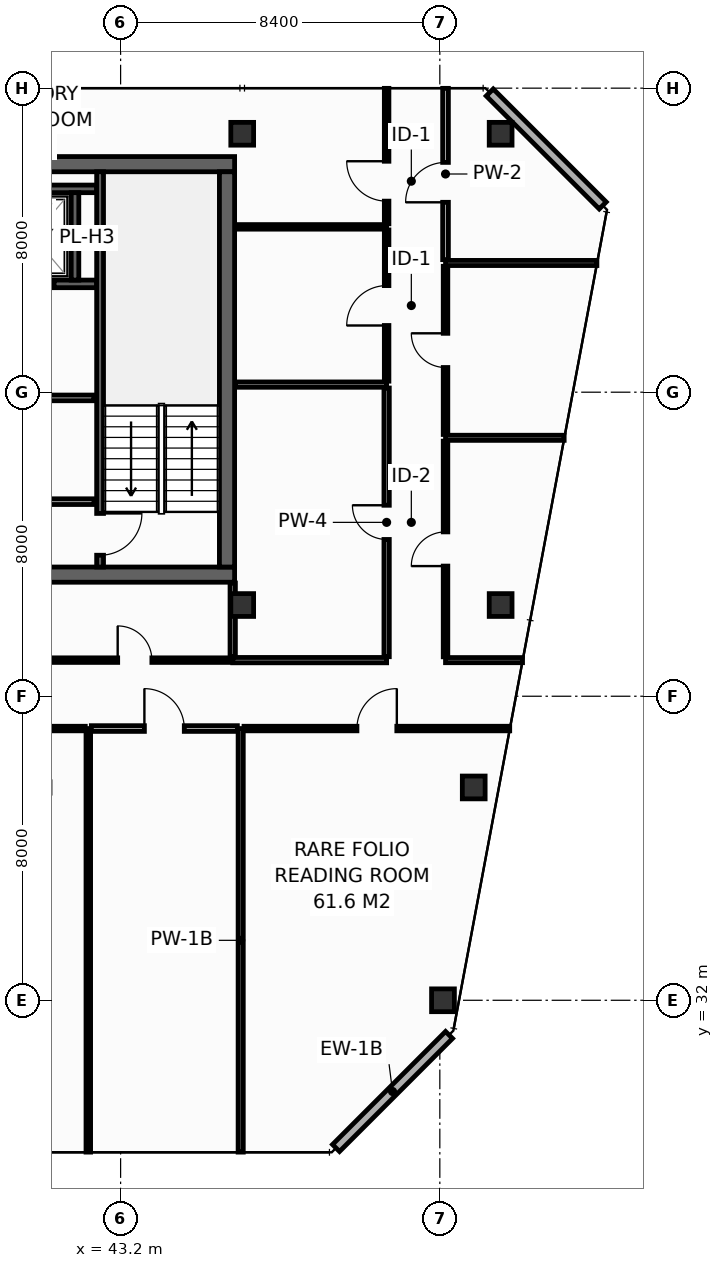
"""IFC4 building model, lengths in metres.
Left out: names, types, materials, properties, quantities, classifications, styles, units other than length and angle.
Written with IfcOpenShell. Run it as: python <this file> out.ifc"""

import sys

from ifc_helpers import new_model, si_unit, direction, frame, frame_2d, origin, origin_2d, place, context, subcontext, project, spatial, rectangle, hollow_rectangle, extrude, element, fill, save


model = new_model("IFC4")
c1 = context("Model", 3, precision=1e-05, world=origin(), true_north=direction((0.0, 1.0)))
c2 = subcontext(c1, "Body", "Model", "MODEL_VIEW")
j1 = project(units=[si_unit("LENGTHUNIT", "METRE"), si_unit("PLANEANGLEUNIT", "RADIAN")], contexts=[c1])
p1 = place(None, origin())
s1 = spatial("IfcSite", under=j1, at=p1, CompositionType="ELEMENT")
p2 = place(p1, origin())
s2 = spatial("IfcBuilding", under=s1, at=p2, CompositionType="ELEMENT")
p3 = place(p2, frame((0.0, 0.0, 283.8)))
s3 = spatial("IfcBuildingStorey", under=s2, at=p3, CompositionType="ELEMENT", Elevation=283.8)
p4 = place(p3, frame((13.7, 43.2, 0.0), z_axis=(0.0, 0.0, 1.0), x_axis=(1.0, 0.0, 0.0)))
e1 = element("IfcWall", 1, at=p4, inside=s3, PredefinedType="SHEAR", context=c2, shape_type="SweptSolid", body=[
    extrude(rectangle(XDim=32.5, YDim=0.4, at=frame_2d((16.25, 0.0))), origin(), (0.0, 0.0, 1.0), 3.55),
])
p5 = place(p4, frame((5.4, 0.0, 0.0)))
e2 = element("IfcOpeningElement", 2, at=p5, cuts=e1, PredefinedType="OPENING", context=c2, shape_type="SweptSolid", body=[
    extrude(rectangle(XDim=1.1, YDim=2.15, at=frame_2d((0.55, 1.075))), frame((0.0, 0.21, 0.0), z_axis=(0.0, -1.0, 0.0), x_axis=(1.0, 0.0, 0.0)), (0.0, 0.0, 1.0), 0.42),
])
p6 = place(p4, frame((25.6, 0.0, 0.0)))
e3 = element("IfcOpeningElement", 3, at=p6, cuts=e1, PredefinedType="OPENING", context=c2, shape_type="SweptSolid", body=[
    extrude(rectangle(XDim=1.1, YDim=2.15, at=frame_2d((0.55, 1.075))), frame((0.0, 0.21, 0.0), z_axis=(0.0, -1.0, 0.0), x_axis=(1.0, 0.0, 0.0)), (0.0, 0.0, 1.0), 0.42),
])
p7 = place(p3, frame((13.7, 54.0, 0.0), z_axis=(0.0, 0.0, 1.0), x_axis=(1.0, 0.0, 0.0)))
e4 = element("IfcWall", 4, at=p7, inside=s3, PredefinedType="SHEAR", context=c2, shape_type="SweptSolid", body=[
    extrude(rectangle(XDim=32.5, YDim=0.4, at=frame_2d((16.25, 0.0))), origin(), (0.0, 0.0, 1.0), 3.55),
])
p8 = place(p3, frame((46.0, 43.4, 0.0), z_axis=(0.0, 0.0, 1.0), x_axis=(0.0, 1.0, 0.0)))
e5 = element("IfcWall", 5, at=p8, inside=s3, PredefinedType="SHEAR", context=c2, shape_type="SweptSolid", body=[
    extrude(rectangle(XDim=10.4, YDim=0.4, at=frame_2d((5.2, 0.0))), origin(), (0.0, 0.0, 1.0), 3.55),
])
for number, where, z_axis, x_axis in (
    (6, (46.4, 54.8, 0.0), (0.0, 0.0, 1.0), (1.0, 0.0, 0.0)),
    (7, (53.2, 54.8, 0.0), (0.0, 0.0, 1.0), (1.0, 0.0, 0.0)),
    (8, (46.4, 42.4, 0.0), (0.0, 0.0, 1.0), (1.0, 0.0, 0.0)),
    (9, (53.2, 42.4, 0.0), (0.0, 0.0, 1.0), (1.0, 0.0, 0.0)),
    (10, (51.683, 32.0, 0.0), (0.0, 0.0, 1.0), (1.0, 0.0, 0.0)),
    (11, (52.492, 37.6, 0.0), (0.0, 0.0, 1.0), (1.0, 0.0, 0.0)),
):
    element("IfcColumn", number, at=place(p3, frame(where, z_axis=z_axis, x_axis=x_axis)), inside=s3, PredefinedType="COLUMN", context=c2, shape_type="SweptSolid", body=[
        extrude(hollow_rectangle(XDim=0.6, YDim=0.6, WallThickness=0.028, at=origin_2d()), origin(), (0.0, 0.0, 1.0), 3.8),
    ])
p9 = place(p3, frame((39.525, 50.85, 0.0), z_axis=(0.0, 0.0, 1.0), x_axis=(1.0, 0.0, 0.0)))
e12 = element("IfcWall", 12, at=p9, inside=s3, PredefinedType="SHEAR", context=c2, shape_type="SweptSolid", body=[
    extrude(rectangle(XDim=3.045, YDim=0.2, at=frame_2d((1.522, 0.0))), origin(), (0.0, 0.0, 1.0), 3.55),
])
p10 = place(p9, frame((0.825, 0.0, 0.0)))
e13 = element("IfcOpeningElement", 13, at=p10, cuts=e12, PredefinedType="OPENING", context=c2, shape_type="SweptSolid", body=[
    extrude(rectangle(XDim=1.1, YDim=2.2, at=frame_2d((0.55, 1.1))), frame((0.0, 0.11, 0.0), z_axis=(0.0, -1.0, 0.0), x_axis=(1.0, 0.0, 0.0)), (0.0, 0.0, 1.0), 0.22),
])
p11 = place(p3, frame((39.525, 53.35, 0.0), z_axis=(0.0, 0.0, 1.0), x_axis=(1.0, 0.0, 0.0)))
e14 = element("IfcWall", 14, at=p11, inside=s3, PredefinedType="SHEAR", context=c2, shape_type="SweptSolid", body=[
    extrude(rectangle(XDim=3.045, YDim=0.2, at=frame_2d((1.522, 0.0))), origin(), (0.0, 0.0, 1.0), 3.55),
])
p12 = place(p3, frame((42.0, 50.95, 0.0), z_axis=(0.0, 0.0, 1.0), x_axis=(0.0, 1.0, 0.0)))
e15 = element("IfcWall", 15, at=p12, inside=s3, PredefinedType="SHEAR", context=c2, shape_type="SweptSolid", body=[
    extrude(rectangle(XDim=2.3, YDim=0.2, at=frame_2d((1.15, 0.0))), origin(), (0.0, 0.0, 1.0), 3.55),
])
p13 = place(p3, frame((42.66, 53.8, 0.0), z_axis=(0.0, 0.0, 1.0), x_axis=(0.0, -1.0, 0.0)))
e16 = element("IfcWall", 16, at=p13, inside=s3, PredefinedType="SHEAR", context=c2, shape_type="SweptSolid", body=[
    extrude(rectangle(XDim=10.4, YDim=0.18, at=frame_2d((5.2, 0.0))), origin(), (0.0, 0.0, 1.0), 3.55),
])
p14 = place(p13, frame((8.99, 0.0, 0.0)))
e17 = element("IfcOpeningElement", 17, at=p14, cuts=e16, PredefinedType="OPENING", context=c2, shape_type="SweptSolid", body=[
    extrude(rectangle(XDim=1.1, YDim=2.15, at=frame_2d((0.55, 1.075))), frame((0.0, 0.1, 0.0), z_axis=(0.0, -1.0, 0.0), x_axis=(1.0, 0.0, 0.0)), (0.0, 0.0, 1.0), 0.2),
])
p15 = place(p3, frame((34.05, 45.12, 0.0), z_axis=(0.0, 0.0, 1.0), x_axis=(1.0, 0.0, 0.0)))
e18 = element("IfcWall", 18, at=p15, inside=s3, PredefinedType="PARTITIONING", context=c2, shape_type="SweptSolid", body=[
    extrude(rectangle(XDim=8.45, YDim=0.15, at=frame_2d((4.225, 0.0))), origin(), (0.0, 0.0, 1.0), 3.55),
])
p16 = place(p15, frame((1.5, 0.0, 0.0)))
e19 = element("IfcOpeningElement", 19, at=p16, cuts=e18, PredefinedType="OPENING", context=c2, shape_type="SweptSolid", body=[
    extrude(rectangle(XDim=0.95, YDim=2.15, at=frame_2d((0.475, 1.075))), frame((0.0, 0.085, 0.0), z_axis=(0.0, -1.0, 0.0), x_axis=(1.0, 0.0, 0.0)), (0.0, 0.0, 1.0), 0.17),
])
p17 = place(p15, frame((5.8, 0.0, 0.0)))
e20 = element("IfcOpeningElement", 20, at=p17, cuts=e18, PredefinedType="OPENING", context=c2, shape_type="SweptSolid", body=[
    extrude(rectangle(XDim=0.95, YDim=2.15, at=frame_2d((0.475, 1.075))), frame((0.0, 0.085, 0.0), z_axis=(0.0, -1.0, 0.0), x_axis=(1.0, 0.0, 0.0)), (0.0, 0.0, 1.0), 0.17),
])
p18 = place(p3, frame((34.05, 47.85, 0.0), z_axis=(0.0, 0.0, 1.0), x_axis=(1.0, 0.0, 0.0)))
e21 = element("IfcWall", 21, at=p18, inside=s3, PredefinedType="PARTITIONING", context=c2, shape_type="SweptSolid", body=[
    extrude(rectangle(XDim=8.45, YDim=0.15, at=frame_2d((4.225, 0.0))), origin(), (0.0, 0.0, 1.0), 3.55),
])
for number, where, z_axis, x_axis in (
    (22, (48.869, 28.113, 0.0), (0.0, 0.0, 1.0), (0.707, 0.707, 0.0)),
    (23, (55.887, 52.913, 0.0), (0.0, 0.0, 1.0), (-0.707, 0.707, 0.0)),
):
    element("IfcWall", number, at=place(p3, frame(where, z_axis=z_axis, x_axis=x_axis)), inside=s3, PredefinedType="STANDARD", context=c2, shape_type="SweptSolid", body=[
        extrude(rectangle(XDim=4.206, YDim=0.26, at=frame_2d((2.103, 0.0))), origin(), (0.0, 0.0, 1.0), 3.55),
    ])
p19 = place(p3, frame((46.15, 40.95, 0.0), z_axis=(0.0, 0.0, 1.0), x_axis=(1.0, 0.0, 0.0)))
e24 = element("IfcWall", 24, at=p19, inside=s3, PredefinedType="PARTITIONING", context=c2, shape_type="SweptSolid", body=[
    extrude(rectangle(XDim=4.05, YDim=0.14, at=frame_2d((2.025, 0.0))), origin(), (0.0, 0.0, 1.0), 3.55),
])
p20 = place(p3, frame((46.15, 41.04, 0.0), z_axis=(0.0, 0.0, 1.0), x_axis=(0.0, 1.0, 0.0)))
e25 = element("IfcWall", 25, at=p20, inside=s3, PredefinedType="PARTITIONING", context=c2, shape_type="SweptSolid", body=[
    extrude(rectangle(XDim=1.94, YDim=0.14, at=frame_2d((0.97, 0.0))), origin(), (0.0, 0.0, 1.0), 3.55),
])
p21 = place(p3, frame((46.22, 48.2, 0.0), z_axis=(0.0, 0.0, 1.0), x_axis=(1.0, 0.0, 0.0)))
e26 = element("IfcWall", 26, at=p21, inside=s3, PredefinedType="PARTITIONING", context=c2, shape_type="SweptSolid", body=[
    extrude(rectangle(XDim=3.98, YDim=0.14, at=frame_2d((1.99, 0.0))), origin(), (0.0, 0.0, 1.0), 3.55),
])
p22 = place(p3, frame((50.2, 41.04, 0.0), z_axis=(0.0, 0.0, 1.0), x_axis=(0.0, 1.0, 0.0)))
e27 = element("IfcWall", 27, at=p22, inside=s3, PredefinedType="PARTITIONING", context=c2, shape_type="SweptSolid", body=[
    extrude(rectangle(XDim=7.07, YDim=0.14, at=frame_2d((3.535, 0.0))), origin(), (0.0, 0.0, 1.0), 2.947),
])
p23 = place(p22, frame((3.085, 0.0, 0.0)))
e28 = element("IfcOpeningElement", 28, at=p23, cuts=e27, PredefinedType="OPENING", context=c2, shape_type="SweptSolid", body=[
    extrude(rectangle(XDim=0.9, YDim=2.1, at=frame_2d((0.45, 1.05))), frame((0.0, 0.08, 0.0), z_axis=(0.0, -1.0, 0.0), x_axis=(1.0, 0.0, 0.0)), (0.0, 0.0, 1.0), 0.16),
])
p24 = place(p3, frame((46.22, 52.35, 0.0), z_axis=(0.0, 0.0, 1.0), x_axis=(1.0, 0.0, 0.0)))
e29 = element("IfcWall", 29, at=p24, inside=s3, PredefinedType="PARTITIONING", context=c2, shape_type="SweptSolid", body=[
    extrude(rectangle(XDim=3.98, YDim=0.12, at=frame_2d((1.99, 0.0))), origin(), (0.0, 0.0, 1.0), 3.55),
])
p25 = place(p3, frame((50.2, 48.29, 0.0), z_axis=(0.0, 0.0, 1.0), x_axis=(0.0, 1.0, 0.0)))
e30 = element("IfcWall", 30, at=p25, inside=s3, PredefinedType="PARTITIONING", context=c2, shape_type="SweptSolid", body=[
    extrude(rectangle(XDim=3.98, YDim=0.12, at=frame_2d((1.99, 0.0))), origin(), (0.0, 0.0, 1.0), 3.55),
])
p26 = place(p25, frame((1.465, 0.0, 0.0)))
e31 = element("IfcOpeningElement", 31, at=p26, cuts=e30, PredefinedType="OPENING", context=c2, shape_type="SweptSolid", body=[
    extrude(rectangle(XDim=1.05, YDim=2.15, at=frame_2d((0.525, 1.075))), frame((0.0, 0.07, 0.0), z_axis=(0.0, -1.0, 0.0), x_axis=(1.0, 0.0, 0.0)), (0.0, 0.0, 1.0), 0.14),
])
p27 = place(p3, frame((50.2, 52.43, 0.0), z_axis=(0.0, 0.0, 1.0), x_axis=(0.0, 1.0, 0.0)))
e32 = element("IfcWall", 32, at=p27, inside=s3, PredefinedType="PARTITIONING", context=c2, shape_type="SweptSolid", body=[
    extrude(rectangle(XDim=3.565, YDim=0.12, at=frame_2d((1.783, 0.0))), origin(), (0.0, 0.0, 1.0), 2.935),
])
p28 = place(p27, frame((0.597, 0.0, 0.0)))
e33 = element("IfcOpeningElement", 33, at=p28, cuts=e32, PredefinedType="OPENING", context=c2, shape_type="SweptSolid", body=[
    extrude(rectangle(XDim=1.05, YDim=2.15, at=frame_2d((0.525, 1.075))), frame((0.0, 0.07, 0.0), z_axis=(0.0, -1.0, 0.0), x_axis=(1.0, 0.0, 0.0)), (0.0, 0.0, 1.0), 0.14),
])
p29 = place(p3, frame((51.75, 40.95, 0.0), z_axis=(0.0, 0.0, 1.0), x_axis=(1.0, 0.0, 0.0)))
e34 = element("IfcWall", 34, at=p29, inside=s3, PredefinedType="PARTITIONING", context=c2, shape_type="SweptSolid", body=[
    extrude(rectangle(XDim=2.026, YDim=0.135, at=frame_2d((1.013, 0.0))), origin(), (0.0, 0.0, 1.0), 3.085),
])
p30 = place(p3, frame((51.75, 46.8, 0.0), z_axis=(0.0, 0.0, 1.0), x_axis=(1.0, 0.0, 0.0)))
e35 = element("IfcWall", 35, at=p30, inside=s3, PredefinedType="PARTITIONING", context=c2, shape_type="SweptSolid", body=[
    extrude(rectangle(XDim=3.122, YDim=0.135, at=frame_2d((1.561, 0.0))), origin(), (0.0, 0.0, 1.0), 2.947),
])
p31 = place(p3, frame((51.75, 51.4, 0.0), z_axis=(0.0, 0.0, 1.0), x_axis=(1.0, 0.0, 0.0)))
e36 = element("IfcWall", 36, at=p31, inside=s3, PredefinedType="PARTITIONING", context=c2, shape_type="SweptSolid", body=[
    extrude(rectangle(XDim=3.983, YDim=0.135, at=frame_2d((1.991, 0.0))), origin(), (0.0, 0.0, 1.0), 2.947),
])
p32 = place(p3, frame((51.75, 41.038, 0.0), z_axis=(0.0, 0.0, 1.0), x_axis=(0.0, 1.0, 0.0)))
e37 = element("IfcWall", 37, at=p32, inside=s3, PredefinedType="PARTITIONING", context=c2, shape_type="SweptSolid", body=[
    extrude(rectangle(XDim=5.675, YDim=0.12, at=frame_2d((2.837, 0.0))), origin(), (0.0, 0.0, 1.0), 2.947),
])
p33 = place(p32, frame((2.387, 0.0, 0.0)))
e38 = element("IfcOpeningElement", 38, at=p33, cuts=e37, PredefinedType="OPENING", context=c2, shape_type="SweptSolid", body=[
    extrude(rectangle(XDim=0.9, YDim=2.1, at=frame_2d((0.45, 1.05))), frame((0.0, 0.07, 0.0), z_axis=(0.0, -1.0, 0.0), x_axis=(1.0, 0.0, 0.0)), (0.0, 0.0, 1.0), 0.14),
])
p34 = place(p3, frame((51.75, 46.887, 0.0), z_axis=(0.0, 0.0, 1.0), x_axis=(0.0, 1.0, 0.0)))
e39 = element("IfcWall", 39, at=p34, inside=s3, PredefinedType="PARTITIONING", context=c2, shape_type="SweptSolid", body=[
    extrude(rectangle(XDim=4.425, YDim=0.12, at=frame_2d((2.212, 0.0))), origin(), (0.0, 0.0, 1.0), 3.55),
])
p35 = place(p34, frame((1.762, 0.0, 0.0)))
e40 = element("IfcOpeningElement", 40, at=p35, cuts=e39, PredefinedType="OPENING", context=c2, shape_type="SweptSolid", body=[
    extrude(rectangle(XDim=0.9, YDim=2.1, at=frame_2d((0.45, 1.05))), frame((0.0, 0.07, 0.0), z_axis=(0.0, -1.0, 0.0), x_axis=(1.0, 0.0, 0.0)), (0.0, 0.0, 1.0), 0.14),
])
p36 = place(p3, frame((51.75, 51.488, 0.0), z_axis=(0.0, 0.0, 1.0), x_axis=(0.0, 1.0, 0.0)))
e41 = element("IfcWall", 41, at=p36, inside=s3, PredefinedType="PARTITIONING", context=c2, shape_type="SweptSolid", body=[
    extrude(rectangle(XDim=4.508, YDim=0.15, at=frame_2d((2.254, 0.0))), origin(), (0.0, 0.0, 1.0), 2.935),
])
p37 = place(p36, frame((1.509, 0.0, 0.0)))
e42 = element("IfcOpeningElement", 42, at=p37, cuts=e41, PredefinedType="OPENING", context=c2, shape_type="SweptSolid", body=[
    extrude(rectangle(XDim=1.05, YDim=2.15, at=frame_2d((0.525, 1.075))), frame((0.0, 0.085, 0.0), z_axis=(0.0, -1.0, 0.0), x_axis=(1.0, 0.0, 0.0)), (0.0, 0.0, 1.0), 0.17),
])
p38 = place(p3, frame((40.995, 40.95, 0.0), z_axis=(0.0, 0.0, 1.0), x_axis=(1.0, 0.0, 0.0)))
e43 = element("IfcWall", 43, at=p38, inside=s3, PredefinedType="PARTITIONING", context=c2, shape_type="SweptSolid", body=[
    extrude(rectangle(XDim=5.155, YDim=0.12, at=frame_2d((2.577, 0.0))), origin(), (0.0, 0.0, 1.0), 3.55),
])
p39 = place(p38, frame((2.128, 0.0, 0.0)))
e44 = element("IfcOpeningElement", 44, at=p39, cuts=e43, PredefinedType="OPENING", context=c2, shape_type="SweptSolid", body=[
    extrude(rectangle(XDim=0.9, YDim=2.1, at=frame_2d((0.45, 1.05))), frame((0.0, 0.07, 0.0), z_axis=(0.0, -1.0, 0.0), x_axis=(1.0, 0.0, 0.0)), (0.0, 0.0, 1.0), 0.14),
])
p40 = place(p3, frame((42.35, 28.005, 0.0), z_axis=(0.0, 0.0, 1.0), x_axis=(0.0, 1.0, 0.0)))
e45 = element("IfcWall", 45, at=p40, inside=s3, PredefinedType="PARTITIONING", context=c2, shape_type="SweptSolid", body=[
    extrude(rectangle(XDim=11.145, YDim=0.12, at=frame_2d((5.573, 0.0))), origin(), (0.0, 0.0, 1.0), 3.047),
])
p41 = place(p3, frame((46.36, 28.005, 0.0), z_axis=(0.0, 0.0, 1.0), x_axis=(0.0, 1.0, 0.0)))
e46 = element("IfcWall", 46, at=p41, inside=s3, PredefinedType="PARTITIONING", context=c2, shape_type="SweptSolid", body=[
    extrude(rectangle(XDim=11.145, YDim=0.135, at=frame_2d((5.573, 0.0))), origin(), (0.0, 0.0, 1.0), 3.047),
])
p42 = place(p3, frame((35.758, 39.15, 0.0), z_axis=(0.0, 0.0, 1.0), x_axis=(1.0, 0.0, 0.0)))
e47 = element("IfcWall", 47, at=p42, inside=s3, PredefinedType="PARTITIONING", context=c2, shape_type="SweptSolid", body=[
    extrude(rectangle(XDim=6.512, YDim=0.12, at=frame_2d((3.256, 0.0))), origin(), (0.0, 0.0, 1.0), 3.047),
])
p43 = place(p42, frame((2.806, 0.0, 0.0)))
e48 = element("IfcOpeningElement", 48, at=p43, cuts=e47, PredefinedType="OPENING", context=c2, shape_type="SweptSolid", body=[
    extrude(rectangle(XDim=0.9, YDim=2.1, at=frame_2d((0.45, 1.05))), frame((0.0, 0.07, 0.0), z_axis=(0.0, -1.0, 0.0), x_axis=(1.0, 0.0, 0.0)), (0.0, 0.0, 1.0), 0.14),
])
p44 = place(p3, frame((42.43, 39.15, 0.0), z_axis=(0.0, 0.0, 1.0), x_axis=(1.0, 0.0, 0.0)))
e49 = element("IfcWall", 49, at=p44, inside=s3, PredefinedType="PARTITIONING", context=c2, shape_type="SweptSolid", body=[
    extrude(rectangle(XDim=3.843, YDim=0.15, at=frame_2d((1.921, 0.0))), origin(), (0.0, 0.0, 1.0), 3.55),
])
p45 = place(p44, frame((1.396, 0.0, 0.0)))
e50 = element("IfcOpeningElement", 50, at=p45, cuts=e49, PredefinedType="OPENING", context=c2, shape_type="SweptSolid", body=[
    extrude(rectangle(XDim=1.05, YDim=2.15, at=frame_2d((0.525, 1.075))), frame((0.0, 0.085, 0.0), z_axis=(0.0, -1.0, 0.0), x_axis=(1.0, 0.0, 0.0)), (0.0, 0.0, 1.0), 0.17),
])
p46 = place(p3, frame((46.448, 39.15, 0.0), z_axis=(0.0, 0.0, 1.0), x_axis=(1.0, 0.0, 0.0)))
e51 = element("IfcWall", 51, at=p46, inside=s3, PredefinedType="PARTITIONING", context=c2, shape_type="SweptSolid", body=[
    extrude(rectangle(XDim=6.992, YDim=0.12, at=frame_2d((3.496, 0.0))), origin(), (0.0, 0.0, 1.0), 3.085),
])
p47 = place(p46, frame((2.971, 0.0, 0.0)))
e52 = element("IfcOpeningElement", 52, at=p47, cuts=e51, PredefinedType="OPENING", context=c2, shape_type="SweptSolid", body=[
    extrude(rectangle(XDim=1.05, YDim=2.15, at=frame_2d((0.525, 1.075))), frame((0.0, 0.07, 0.0), z_axis=(0.0, -1.0, 0.0), x_axis=(1.0, 0.0, 0.0)), (0.0, 0.0, 1.0), 0.14),
])
p48 = place(p10, origin())
e53 = element("IfcDoor", 53, at=p48, inside=s3, OperationType="SLIDING_TO_LEFT", PredefinedType="DOOR", context=c2, shape_type="SweptSolid", body=[
    extrude(rectangle(XDim=1.1, YDim=2.2, at=frame_2d((0.55, 1.1))), frame((0.0, 0.025, 0.0), z_axis=(0.0, -1.0, 0.0), x_axis=(1.0, 0.0, 0.0)), (0.0, 0.0, 1.0), 0.05),
])
fill(e13, e53)
p49 = place(p14, origin())
e54 = element("IfcDoor", 54, at=p49, inside=s3, OperationType="SINGLE_SWING_LEFT", PredefinedType="DOOR", context=c2, shape_type="SweptSolid", body=[
    extrude(rectangle(XDim=1.1, YDim=2.15, at=frame_2d((0.55, 1.075))), frame((0.0, 0.025, 0.0), z_axis=(0.0, -1.0, 0.0), x_axis=(1.0, 0.0, 0.0)), (0.0, 0.0, 1.0), 0.05),
])
fill(e17, e54)
p50 = place(p23, origin())
e55 = element("IfcDoor", 55, at=p50, inside=s3, OperationType="SINGLE_SWING_RIGHT", PredefinedType="DOOR", context=c2, shape_type="SweptSolid", body=[
    extrude(rectangle(XDim=0.9, YDim=2.1, at=frame_2d((0.45, 1.05))), frame((0.0, 0.025, 0.0), z_axis=(0.0, -1.0, 0.0), x_axis=(1.0, 0.0, 0.0)), (0.0, 0.0, 1.0), 0.05),
])
fill(e28, e55)
p51 = place(p26, origin())
e56 = element("IfcDoor", 56, at=p51, inside=s3, OperationType="SINGLE_SWING_LEFT", PredefinedType="DOOR", context=c2, shape_type="SweptSolid", body=[
    extrude(rectangle(XDim=1.05, YDim=2.15, at=frame_2d((0.525, 1.075))), frame((0.0, 0.025, 0.0), z_axis=(0.0, -1.0, 0.0), x_axis=(1.0, 0.0, 0.0)), (0.0, 0.0, 1.0), 0.05),
])
fill(e31, e56)
p52 = place(p28, origin())
e57 = element("IfcDoor", 57, at=p52, inside=s3, OperationType="SINGLE_SWING_RIGHT", PredefinedType="DOOR", context=c2, shape_type="SweptSolid", body=[
    extrude(rectangle(XDim=1.05, YDim=2.15, at=frame_2d((0.525, 1.075))), frame((0.0, 0.025, 0.0), z_axis=(0.0, -1.0, 0.0), x_axis=(1.0, 0.0, 0.0)), (0.0, 0.0, 1.0), 0.05),
])
fill(e33, e57)
p53 = place(p33, origin())
e58 = element("IfcDoor", 58, at=p53, inside=s3, OperationType="SINGLE_SWING_LEFT", PredefinedType="DOOR", context=c2, shape_type="SweptSolid", body=[
    extrude(rectangle(XDim=0.9, YDim=2.1, at=frame_2d((0.45, 1.05))), frame((0.0, 0.025, 0.0), z_axis=(0.0, -1.0, 0.0), x_axis=(1.0, 0.0, 0.0)), (0.0, 0.0, 1.0), 0.05),
])
fill(e38, e58)
p54 = place(p35, origin())
e59 = element("IfcDoor", 59, at=p54, inside=s3, OperationType="SINGLE_SWING_RIGHT", PredefinedType="DOOR", context=c2, shape_type="SweptSolid", body=[
    extrude(rectangle(XDim=0.9, YDim=2.1, at=frame_2d((0.45, 1.05))), frame((0.0, 0.025, 0.0), z_axis=(0.0, -1.0, 0.0), x_axis=(1.0, 0.0, 0.0)), (0.0, 0.0, 1.0), 0.05),
])
fill(e40, e59)
p55 = place(p37, origin())
e60 = element("IfcDoor", 60, at=p55, inside=s3, OperationType="SINGLE_SWING_LEFT", PredefinedType="DOOR", context=c2, shape_type="SweptSolid", body=[
    extrude(rectangle(XDim=1.05, YDim=2.15, at=frame_2d((0.525, 1.075))), frame((0.0, 0.025, 0.0), z_axis=(0.0, -1.0, 0.0), x_axis=(1.0, 0.0, 0.0)), (0.0, 0.0, 1.0), 0.05),
])
fill(e42, e60)
p56 = place(p39, origin())
e61 = element("IfcDoor", 61, at=p56, inside=s3, OperationType="SINGLE_SWING_LEFT", PredefinedType="DOOR", context=c2, shape_type="SweptSolid", body=[
    extrude(rectangle(XDim=0.9, YDim=2.1, at=frame_2d((0.45, 1.05))), frame((0.0, 0.025, 0.0), z_axis=(0.0, -1.0, 0.0), x_axis=(1.0, 0.0, 0.0)), (0.0, 0.0, 1.0), 0.05),
])
fill(e44, e61)
p57 = place(p45, origin())
e62 = element("IfcDoor", 62, at=p57, inside=s3, OperationType="SINGLE_SWING_LEFT", PredefinedType="DOOR", context=c2, shape_type="SweptSolid", body=[
    extrude(rectangle(XDim=1.05, YDim=2.15, at=frame_2d((0.525, 1.075))), frame((0.0, 0.025, 0.0), z_axis=(0.0, -1.0, 0.0), x_axis=(1.0, 0.0, 0.0)), (0.0, 0.0, 1.0), 0.05),
])
fill(e50, e62)
p58 = place(p47, origin())
e63 = element("IfcDoor", 63, at=p58, inside=s3, OperationType="SINGLE_SWING_RIGHT", PredefinedType="DOOR", context=c2, shape_type="SweptSolid", body=[
    extrude(rectangle(XDim=1.05, YDim=2.15, at=frame_2d((0.525, 1.075))), frame((0.0, 0.025, 0.0), z_axis=(0.0, -1.0, 0.0), x_axis=(1.0, 0.0, 0.0)), (0.0, 0.0, 1.0), 0.05),
])
fill(e52, e63)
save(model, sys.argv[1])
